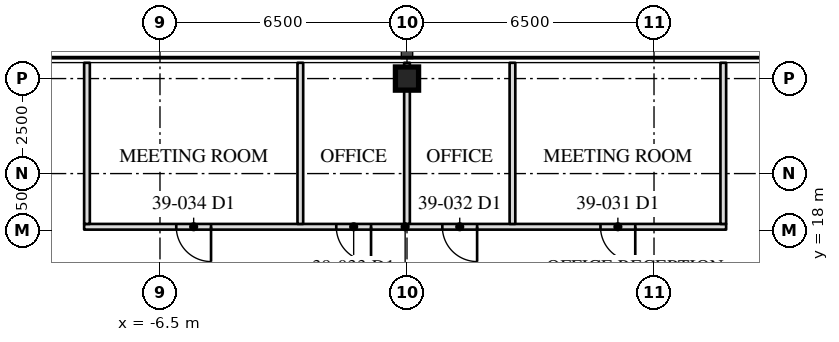
"""IFC4 building model, lengths in metres.
Left out: names, types, materials, properties, quantities, classifications, styles, units other than length and angle.
Written with IfcOpenShell. Run it as: python <this file> out.ifc"""

import sys

from ifc_helpers import new_model, si_unit, direction, frame, frame_2d, origin, origin_2d, place, context, subcontext, project, spatial, rectangle, hollow_rectangle, extrude, element, fill, save


model = new_model("IFC4")
c1 = context("Model", 3, precision=1e-05, world=origin(), true_north=direction((0.0, 1.0)))
c2 = subcontext(c1, "Body", "Model", "MODEL_VIEW")
j1 = project(units=[si_unit("LENGTHUNIT", "METRE"), si_unit("PLANEANGLEUNIT", "RADIAN")], contexts=[c1])
p1 = place(None, origin())
s1 = spatial("IfcSite", under=j1, at=p1, CompositionType="ELEMENT")
p2 = place(p1, origin())
s2 = spatial("IfcBuilding", under=s1, at=p2, CompositionType="ELEMENT")
p3 = place(p2, frame((0.0, 0.0, 166.4)))
s3 = spatial("IfcBuildingStorey", under=s2, at=p3, CompositionType="ELEMENT", Elevation=166.4)
p4 = place(p3, frame((0.0, 22.0, 0.0), z_axis=(0.0, 0.0, 1.0), x_axis=(1.0, 0.0, 0.0)))
e1 = element("IfcColumn", 1, at=p4, inside=s3, PredefinedType="COLUMN", context=c2, shape_type="SweptSolid", body=[
    extrude(hollow_rectangle(XDim=0.61, YDim=0.61, WallThickness=0.076, at=origin_2d()), origin(), (0.0, 0.0, 1.0), 4.1),
])
p5 = place(p3, frame((8.398, 18.1, 0.0), z_axis=(0.0, 0.0, 1.0), x_axis=(-1.0, 0.0, 0.0)))
e2 = element("IfcWall", 2, at=p5, inside=s3, PredefinedType="PARTITIONING", context=c2, shape_type="SweptSolid", body=[
    extrude(rectangle(XDim=16.894, YDim=0.15, at=frame_2d((8.447, 0.0))), origin(), (0.0, 0.0, 1.0), 3.91),
])
p6 = place(p5, frame((2.392, 0.0, 0.0)))
e3 = element("IfcOpeningElement", 3, at=p6, cuts=e2, PredefinedType="OPENING", context=c2, shape_type="SweptSolid", body=[
    extrude(rectangle(XDim=0.915, YDim=2.134, at=frame_2d((0.458, 1.067))), frame((0.0, 0.085, 0.0), z_axis=(0.0, -1.0, 0.0), x_axis=(1.0, 0.0, 0.0)), (0.0, 0.0, 1.0), 0.17),
])
p7 = place(p5, frame((6.553, 0.0, 0.0)))
e4 = element("IfcOpeningElement", 4, at=p7, cuts=e2, PredefinedType="OPENING", context=c2, shape_type="SweptSolid", body=[
    extrude(rectangle(XDim=0.915, YDim=2.134, at=frame_2d((0.458, 1.067))), frame((0.0, 0.085, 0.0), z_axis=(0.0, -1.0, 0.0), x_axis=(1.0, 0.0, 0.0)), (0.0, 0.0, 1.0), 0.17),
])
p8 = place(p5, frame((9.344, 0.0, 0.0)))
e5 = element("IfcOpeningElement", 5, at=p8, cuts=e2, PredefinedType="OPENING", context=c2, shape_type="SweptSolid", body=[
    extrude(rectangle(XDim=0.915, YDim=2.134, at=frame_2d((0.458, 1.067))), frame((0.0, 0.085, 0.0), z_axis=(0.0, -1.0, 0.0), x_axis=(1.0, 0.0, 0.0)), (0.0, 0.0, 1.0), 0.17),
])
p9 = place(p5, frame((13.554, 0.0, 0.0)))
e6 = element("IfcOpeningElement", 6, at=p9, cuts=e2, PredefinedType="OPENING", context=c2, shape_type="SweptSolid", body=[
    extrude(rectangle(XDim=0.915, YDim=2.134, at=frame_2d((0.458, 1.067))), frame((0.0, 0.085, 0.0), z_axis=(0.0, -1.0, 0.0), x_axis=(1.0, 0.0, 0.0)), (0.0, 0.0, 1.0), 0.17),
])
for number, where, z_axis, x_axis in (
    (7, (8.323, 18.175, 0.0), (0.0, 0.0, 1.0), (0.0, 1.0, 0.0)),
    (8, (2.775, 18.175, 0.0), (0.0, 0.0, 1.0), (0.0, 1.0, 0.0)),
):
    element("IfcWall", number, at=place(p3, frame(where, z_axis=z_axis, x_axis=x_axis)), inside=s3, PredefinedType="PARTITIONING", context=c2, shape_type="SweptSolid", body=[
        extrude(rectangle(XDim=4.24, YDim=0.15, at=frame_2d((2.12, 0.0))), origin(), (0.0, 0.0, 1.0), 3.91),
    ])
p10 = place(p3, frame((0.0, 18.175, 0.0), z_axis=(0.0, 0.0, 1.0), x_axis=(0.0, 1.0, 0.0)))
e9 = element("IfcWall", 9, at=p10, inside=s3, PredefinedType="PARTITIONING", context=c2, shape_type="SweptSolid", body=[
    extrude(rectangle(XDim=4.24, YDim=0.15, at=frame_2d((2.12, 0.0))), origin(), (0.0, 0.0, 1.0), 3.326),
])
for number, where, z_axis, x_axis in (
    (10, (-2.807, 18.175, 0.0), (0.0, 0.0, 1.0), (0.0, 1.0, 0.0)),
    (11, (-8.421, 18.175, 0.0), (0.0, 0.0, 1.0), (0.0, 1.0, 0.0)),
):
    element("IfcWall", number, at=place(p3, frame(where, z_axis=z_axis, x_axis=x_axis)), inside=s3, PredefinedType="PARTITIONING", context=c2, shape_type="SweptSolid", body=[
        extrude(rectangle(XDim=4.24, YDim=0.15, at=frame_2d((2.12, 0.0))), origin(), (0.0, 0.0, 1.0), 3.91),
    ])
p11 = place(p6, origin())
e12 = element("IfcDoor", 12, at=p11, inside=s3, OperationType="SINGLE_SWING_LEFT", PredefinedType="DOOR", context=c2, shape_type="SweptSolid", body=[
    extrude(rectangle(XDim=0.915, YDim=2.134, at=frame_2d((0.458, 1.067))), frame((0.0, 0.025, 0.0), z_axis=(0.0, -1.0, 0.0), x_axis=(1.0, 0.0, 0.0)), (0.0, 0.0, 1.0), 0.05),
])
fill(e3, e12)
p12 = place(p7, origin())
e13 = element("IfcDoor", 13, at=p12, inside=s3, OperationType="SINGLE_SWING_LEFT", PredefinedType="DOOR", context=c2, shape_type="SweptSolid", body=[
    extrude(rectangle(XDim=0.915, YDim=2.134, at=frame_2d((0.458, 1.067))), frame((0.0, 0.025, 0.0), z_axis=(0.0, -1.0, 0.0), x_axis=(1.0, 0.0, 0.0)), (0.0, 0.0, 1.0), 0.05),
])
fill(e4, e13)
p13 = place(p8, origin())
e14 = element("IfcDoor", 14, at=p13, inside=s3, OperationType="SINGLE_SWING_LEFT", PredefinedType="DOOR", context=c2, shape_type="SweptSolid", body=[
    extrude(rectangle(XDim=0.915, YDim=2.134, at=frame_2d((0.458, 1.067))), frame((0.0, 0.025, 0.0), z_axis=(0.0, -1.0, 0.0), x_axis=(1.0, 0.0, 0.0)), (0.0, 0.0, 1.0), 0.05),
])
fill(e5, e14)
p14 = place(p9, origin())
e15 = element("IfcDoor", 15, at=p14, inside=s3, OperationType="SINGLE_SWING_LEFT", PredefinedType="DOOR", context=c2, shape_type="SweptSolid", body=[
    extrude(rectangle(XDim=0.915, YDim=2.134, at=frame_2d((0.458, 1.067))), frame((0.0, 0.025, 0.0), z_axis=(0.0, -1.0, 0.0), x_axis=(1.0, 0.0, 0.0)), (0.0, 0.0, 1.0), 0.05),
])
fill(e6, e15)
save(model, sys.argv[1])
